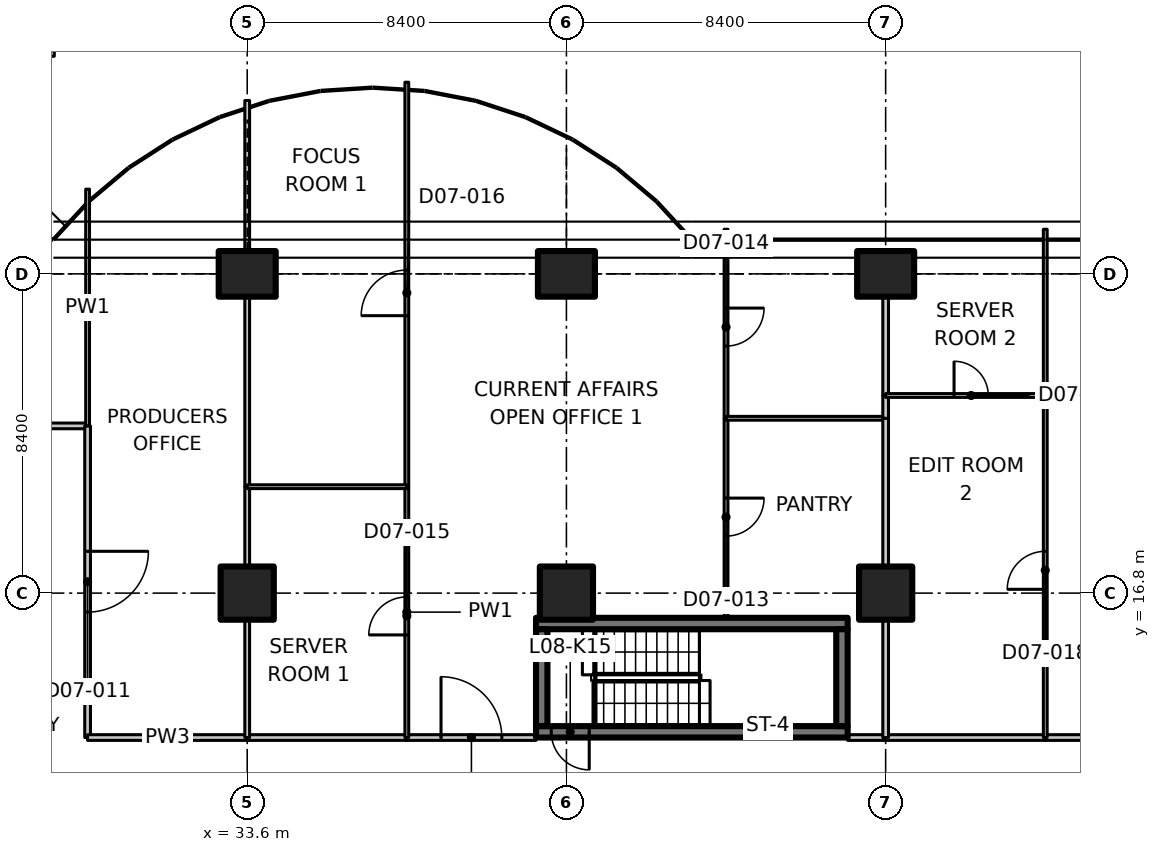
"""IFC4 building model, lengths in metres.
Left out: names, types, materials, properties, quantities, classifications, styles, units other than length and angle.
Written with IfcOpenShell. Run it as: python <this file> out.ifc"""

import sys

from ifc_helpers import new_model, si_unit, direction, frame, frame_2d, origin, origin_2d, place, context, subcontext, project, spatial, polyline, rectangle, outline, extrude, element, fill, save


model = new_model("IFC4")
c1 = context("Model", 3, precision=1e-05, world=origin(), true_north=direction((0.0, 1.0)))
c2 = subcontext(c1, "Body", "Model", "MODEL_VIEW")
j1 = project(units=[si_unit("LENGTHUNIT", "METRE"), si_unit("PLANEANGLEUNIT", "RADIAN")], contexts=[c1])
p1 = place(None, origin())
s1 = spatial("IfcSite", under=j1, at=p1, CompositionType="ELEMENT")
p2 = place(p1, origin())
s2 = spatial("IfcBuilding", under=s1, at=p2, CompositionType="ELEMENT")
p3 = place(p2, frame((0.0, 0.0, 43.7)))
s3 = spatial("IfcBuildingStorey", under=s2, at=p3, CompositionType="ELEMENT", Elevation=43.7)
p4 = place(p3, frame((33.6, 16.8, 0.0), z_axis=(0.0, 0.0, 1.0), x_axis=(1.0, 0.0, 0.0)))
e1 = element("IfcColumn", 1, at=p4, inside=s3, PredefinedType="COLUMN", context=c2, shape_type="SweptSolid", body=[
    extrude(rectangle(XDim=1.4, YDim=1.4, at=origin_2d()), origin(), (0.0, 0.0, 1.0), 3.35),
])
p5 = place(p3, frame((33.6, 25.2, 0.0), z_axis=(0.0, 0.0, 1.0), x_axis=(0.0, 1.0, 0.0)))
e2 = element("IfcColumn", 2, at=p5, inside=s3, PredefinedType="COLUMN", context=c2, shape_type="SweptSolid", body=[
    extrude(rectangle(XDim=1.2, YDim=1.5, at=origin_2d()), origin(), (0.0, 0.0, 1.0), 3.35),
])
p6 = place(p3, frame((42.0, 16.8, 0.0), z_axis=(0.0, 0.0, 1.0), x_axis=(1.0, 0.0, 0.0)))
e3 = element("IfcColumn", 3, at=p6, inside=s3, PredefinedType="COLUMN", context=c2, shape_type="SweptSolid", body=[
    extrude(rectangle(XDim=1.4, YDim=1.4, at=origin_2d()), origin(), (0.0, 0.0, 1.0), 3.35),
])
p7 = place(p3, frame((42.0, 25.2, 0.0), z_axis=(0.0, 0.0, 1.0), x_axis=(0.0, 1.0, 0.0)))
e4 = element("IfcColumn", 4, at=p7, inside=s3, PredefinedType="COLUMN", context=c2, shape_type="SweptSolid", body=[
    extrude(rectangle(XDim=1.2, YDim=1.5, at=origin_2d()), origin(), (0.0, 0.0, 1.0), 3.35),
])
p8 = place(p3, frame((50.4, 16.8, 0.0), z_axis=(0.0, 0.0, 1.0), x_axis=(1.0, 0.0, 0.0)))
e5 = element("IfcColumn", 5, at=p8, inside=s3, PredefinedType="COLUMN", context=c2, shape_type="SweptSolid", body=[
    extrude(rectangle(XDim=1.4, YDim=1.4, at=origin_2d()), origin(), (0.0, 0.0, 1.0), 3.35),
])
p9 = place(p3, frame((50.4, 25.2, 0.0), z_axis=(0.0, 0.0, 1.0), x_axis=(0.0, 1.0, 0.0)))
e6 = element("IfcColumn", 6, at=p9, inside=s3, PredefinedType="COLUMN", context=c2, shape_type="SweptSolid", body=[
    extrude(rectangle(XDim=1.2, YDim=1.5, at=origin_2d()), origin(), (0.0, 0.0, 1.0), 3.35),
])
p10 = place(p3, frame((49.4, 13.15, 0.0), z_axis=(0.0, 0.0, 1.0), x_axis=(-1.0, 0.0, 0.0)))
e7 = element("IfcWall", 7, at=p10, inside=s3, PredefinedType="SHEAR", context=c2, shape_type="SweptSolid", body=[
    extrude(rectangle(XDim=8.2, YDim=0.3, at=frame_2d((4.1, 0.0))), origin(), (0.0, 0.0, 1.0), 3.35),
])
p11 = place(p10, frame((6.8, 0.0, 0.0)))
e8 = element("IfcOpeningElement", 8, at=p11, cuts=e7, PredefinedType="OPENING", context=c2, shape_type="SweptSolid", body=[
    extrude(rectangle(XDim=1.0, YDim=2.1, at=frame_2d((0.5, 1.05))), frame((0.0, 0.16, 0.0), z_axis=(0.0, -1.0, 0.0), x_axis=(1.0, 0.0, 0.0)), (0.0, 0.0, 1.0), 0.32),
])
p12 = place(p3, frame((41.2, 16.0, 0.0), z_axis=(0.0, 0.0, 1.0), x_axis=(1.0, 0.0, 0.0)))
e9 = element("IfcWall", 9, at=p12, inside=s3, PredefinedType="SHEAR", context=c2, shape_type="SweptSolid", body=[
    extrude(rectangle(XDim=8.2, YDim=0.3, at=frame_2d((4.1, 0.0))), origin(), (0.0, 0.0, 1.0), 3.35),
])
for number, where, z_axis, x_axis in (
    (10, (41.35, 13.3, 0.0), (0.0, 0.0, 1.0), (0.0, 1.0, 0.0)),
    (11, (49.25, 13.3, 0.0), (0.0, 0.0, 1.0), (0.0, 1.0, 0.0)),
):
    element("IfcWall", number, at=place(p3, frame(where, z_axis=z_axis, x_axis=x_axis)), inside=s3, PredefinedType="SHEAR", context=c2, shape_type="SweptSolid", body=[
        extrude(rectangle(XDim=2.55, YDim=0.3, at=frame_2d((1.275, 0.0))), origin(), (0.0, 0.0, 1.0), 3.35),
    ])
p13 = place(p3, frame((25.2, 21.2, 0.0), z_axis=(0.0, 0.0, 1.0), x_axis=(1.0, 0.0, 0.0)))
e12 = element("IfcWall", 12, at=p13, inside=s3, PredefinedType="PARTITIONING", context=c2, shape_type="SweptSolid", body=[
    extrude(rectangle(XDim=4.2, YDim=0.15, at=frame_2d((2.1, 0.0))), origin(), (0.0, 0.0, 1.0), 3.33),
])
p14 = place(p3, frame((29.4, 21.2, 0.0), z_axis=(0.0, 0.0, 1.0), x_axis=(0.0, -1.0, 0.0)))
e13 = element("IfcWall", 13, at=p14, inside=s3, PredefinedType="PARTITIONING", context=c2, shape_type="SweptSolid", body=[
    extrude(rectangle(XDim=8.2, YDim=0.15, at=frame_2d((4.1, 0.0))), origin(), (0.0, 0.0, 1.0), 3.33),
])
p15 = place(p14, frame((3.3, 0.0, 0.0)))
e14 = element("IfcOpeningElement", 14, at=p15, cuts=e13, PredefinedType="OPENING", context=c2, shape_type="SweptSolid", body=[
    extrude(rectangle(XDim=1.6, YDim=2.1, at=frame_2d((0.8, 1.05))), frame((0.0, 0.085, 0.0), z_axis=(0.0, -1.0, 0.0), x_axis=(1.0, 0.0, 0.0)), (0.0, 0.0, 1.0), 0.17),
])
p16 = place(p3, frame((29.4, 27.429, 0.0), z_axis=(0.0, 0.0, 1.0), x_axis=(0.0, -1.0, 0.0)))
e15 = element("IfcWall", 15, at=p16, inside=s3, PredefinedType="PARTITIONING", context=c2, shape_type="SweptSolid", body=[
    extrude(outline(polyline([(0.0, 0.0), (6.229, 0.0), (6.229, 3.33), (2.679, 3.33), (2.677, 2.98), (1.781, 2.98), (1.779, 3.33), (0.154, 3.33), (0.0, 3.33), (0.0, 0.0)])), frame((0.0, 0.05, 0.0), z_axis=(0.0, -1.0, 0.0), x_axis=(1.0, 0.0, 0.0)), (0.0, 0.0, 1.0), 0.1),
])
p17 = place(p3, frame((25.2, 31.0, 0.0), z_axis=(0.0, 0.0, 1.0), x_axis=(1.0, 0.0, 0.0)))
e16 = element("IfcWall", 16, at=p17, inside=s3, PredefinedType="PARTITIONING", context=c2, shape_type="SweptSolid", body=[
    extrude(rectangle(XDim=3.324, YDim=0.15, at=frame_2d((1.662, 0.0))), origin(), (0.0, 0.0, 1.0), 2.98),
])
p18 = place(p3, frame((29.4, 13.0, 0.0), z_axis=(0.0, 0.0, 1.0), x_axis=(1.0, 0.0, 0.0)))
e17 = element("IfcWall", 17, at=p18, inside=s3, PredefinedType="PARTITIONING", context=c2, shape_type="SweptSolid", body=[
    extrude(rectangle(XDim=4.2, YDim=0.15, at=frame_2d((2.1, 0.0))), origin(), (0.0, 0.0, 1.0), 3.33),
])
p19 = place(p3, frame((37.8, 13.0, 0.0), z_axis=(0.0, 0.0, 1.0), x_axis=(1.0, 0.0, 0.0)))
e18 = element("IfcWall", 18, at=p19, inside=s3, PredefinedType="PARTITIONING", context=c2, shape_type="SweptSolid", body=[
    extrude(rectangle(XDim=3.4, YDim=0.15, at=frame_2d((1.7, 0.0))), origin(), (0.0, 0.0, 1.0), 3.33),
])
p20 = place(p19, frame((0.9, 0.0, 0.0)))
e19 = element("IfcOpeningElement", 19, at=p20, cuts=e18, PredefinedType="OPENING", context=c2, shape_type="SweptSolid", body=[
    extrude(rectangle(XDim=1.6, YDim=2.1, at=frame_2d((0.8, 1.05))), frame((0.0, 0.085, 0.0), z_axis=(0.0, -1.0, 0.0), x_axis=(1.0, 0.0, 0.0)), (0.0, 0.0, 1.0), 0.17),
])
p21 = place(p3, frame((49.4, 13.0, 0.0), z_axis=(0.0, 0.0, 1.0), x_axis=(1.0, 0.0, 0.0)))
e20 = element("IfcWall", 20, at=p21, inside=s3, PredefinedType="PARTITIONING", context=c2, shape_type="SweptSolid", body=[
    extrude(rectangle(XDim=1.0, YDim=0.15, at=frame_2d((0.5, 0.0))), origin(), (0.0, 0.0, 1.0), 3.33),
])
p22 = place(p3, frame((33.6, 13.0, 0.0), z_axis=(0.0, 0.0, 1.0), x_axis=(1.0, 0.0, 0.0)))
e21 = element("IfcWall", 21, at=p22, inside=s3, PredefinedType="PARTITIONING", context=c2, shape_type="SweptSolid", body=[
    extrude(rectangle(XDim=4.2, YDim=0.15, at=frame_2d((2.1, 0.0))), origin(), (0.0, 0.0, 1.0), 3.33),
])
p23 = place(p3, frame((54.6, 13.0, 0.0), z_axis=(0.0, 0.0, 1.0), x_axis=(1.0, 0.0, 0.0)))
e22 = element("IfcWall", 22, at=p23, inside=s3, PredefinedType="PARTITIONING", context=c2, shape_type="SweptSolid", body=[
    extrude(rectangle(XDim=8.4, YDim=0.15, at=frame_2d((4.2, 0.0))), origin(), (0.0, 0.0, 1.0), 3.33),
])
p24 = place(p23, frame((3.3, 0.0, 0.0)))
e23 = element("IfcOpeningElement", 23, at=p24, cuts=e22, PredefinedType="OPENING", context=c2, shape_type="SweptSolid", body=[
    extrude(rectangle(XDim=1.6, YDim=2.1, at=frame_2d((0.8, 1.05))), frame((0.0, 0.085, 0.0), z_axis=(0.0, -1.0, 0.0), x_axis=(1.0, 0.0, 0.0)), (0.0, 0.0, 1.0), 0.17),
])
p25 = place(p3, frame((50.4, 13.0, 0.0), z_axis=(0.0, 0.0, 1.0), x_axis=(1.0, 0.0, 0.0)))
e24 = element("IfcWall", 24, at=p25, inside=s3, PredefinedType="PARTITIONING", context=c2, shape_type="SweptSolid", body=[
    extrude(rectangle(XDim=4.2, YDim=0.15, at=frame_2d((2.1, 0.0))), origin(), (0.0, 0.0, 1.0), 3.33),
])
p26 = place(p3, frame((33.6, 19.6, 0.0), z_axis=(0.0, 0.0, 1.0), x_axis=(0.0, -1.0, 0.0)))
e25 = element("IfcWall", 25, at=p26, inside=s3, PredefinedType="PARTITIONING", context=c2, shape_type="SweptSolid", body=[
    extrude(rectangle(XDim=2.08, YDim=0.125, at=frame_2d((1.04, 0.0))), origin(), (0.0, 0.0, 1.0), 3.33),
])
p27 = place(p3, frame((33.6, 16.08, 0.0), z_axis=(0.0, 0.0, 1.0), x_axis=(0.0, -1.0, 0.0)))
e26 = element("IfcWall", 26, at=p27, inside=s3, PredefinedType="PARTITIONING", context=c2, shape_type="SweptSolid", body=[
    extrude(rectangle(XDim=3.08, YDim=0.125, at=frame_2d((1.54, 0.0))), origin(), (0.0, 0.0, 1.0), 3.33),
])
p28 = place(p3, frame((33.6, 29.762, 0.0), z_axis=(0.0, 0.0, 1.0), x_axis=(0.0, -1.0, 0.0)))
e27 = element("IfcWall", 27, at=p28, inside=s3, PredefinedType="PARTITIONING", context=c2, shape_type="SweptSolid", body=[
    extrude(rectangle(XDim=3.942, YDim=0.125, at=frame_2d((1.971, 0.0))), origin(), (0.0, 0.0, 1.0), 2.98),
])
p29 = place(p3, frame((33.6, 24.58, 0.0), z_axis=(0.0, 0.0, 1.0), x_axis=(0.0, -1.0, 0.0)))
e28 = element("IfcWall", 28, at=p29, inside=s3, PredefinedType="PARTITIONING", context=c2, shape_type="SweptSolid", body=[
    extrude(rectangle(XDim=4.98, YDim=0.125, at=frame_2d((2.49, 0.0))), origin(), (0.0, 0.0, 1.0), 3.33),
])
p30 = place(p3, frame((46.2, 21.4, 0.0), z_axis=(0.0, 0.0, 1.0), x_axis=(0.0, -1.0, 0.0)))
e29 = element("IfcWall", 29, at=p30, inside=s3, PredefinedType="PARTITIONING", context=c2, shape_type="SweptSolid", body=[
    extrude(rectangle(XDim=5.25, YDim=0.1, at=frame_2d((2.625, 0.0))), origin(), (0.0, 0.0, 1.0), 3.33),
])
p31 = place(p30, frame((2.1, 0.0, 0.0)))
e30 = element("IfcOpeningElement", 30, at=p31, cuts=e29, PredefinedType="OPENING", context=c2, shape_type="SweptSolid", body=[
    extrude(rectangle(XDim=1.0, YDim=2.1, at=frame_2d((0.5, 1.05))), frame((0.0, 0.06, 0.0), z_axis=(0.0, -1.0, 0.0), x_axis=(1.0, 0.0, 0.0)), (0.0, 0.0, 1.0), 0.12),
])
p32 = place(p3, frame((46.2, 26.374, 0.0), z_axis=(0.0, 0.0, 1.0), x_axis=(0.0, -1.0, 0.0)))
e31 = element("IfcWall", 31, at=p32, inside=s3, PredefinedType="PARTITIONING", context=c2, shape_type="SweptSolid", body=[
    extrude(outline(polyline([(0.0, 0.0), (4.974, 0.0), (4.974, 3.33), (1.624, 3.33), (1.622, 2.98), (0.726, 2.98), (0.724, 3.33), (0.074, 3.33), (0.0, 3.33), (0.0, 0.0)])), frame((0.0, 0.05, 0.0), z_axis=(0.0, -1.0, 0.0), x_axis=(1.0, 0.0, 0.0)), (0.0, 0.0, 1.0), 0.1),
])
p33 = place(p32, frame((2.074, 0.0, 0.0)))
e32 = element("IfcOpeningElement", 32, at=p33, cuts=e31, PredefinedType="OPENING", context=c2, shape_type="SweptSolid", body=[
    extrude(rectangle(XDim=1.0, YDim=2.1, at=frame_2d((0.5, 1.05))), frame((0.0, 0.06, 0.0), z_axis=(0.0, -1.0, 0.0), x_axis=(1.0, 0.0, 0.0)), (0.0, 0.0, 1.0), 0.12),
])
p34 = place(p3, frame((37.8, 13.0, 0.0), z_axis=(0.0, 0.0, 1.0), x_axis=(0.0, 1.0, 0.0)))
e33 = element("IfcWall", 33, at=p34, inside=s3, PredefinedType="PARTITIONING", context=c2, shape_type="SweptSolid", body=[
    extrude(rectangle(XDim=6.6, YDim=0.1, at=frame_2d((3.3, 0.0))), origin(), (0.0, 0.0, 1.0), 3.33),
])
p35 = place(p34, frame((2.7, 0.0, 0.0)))
e34 = element("IfcOpeningElement", 34, at=p35, cuts=e33, PredefinedType="OPENING", context=c2, shape_type="SweptSolid", body=[
    extrude(rectangle(XDim=1.0, YDim=2.1, at=frame_2d((0.5, 1.05))), frame((0.0, 0.06, 0.0), z_axis=(0.0, -1.0, 0.0), x_axis=(1.0, 0.0, 0.0)), (0.0, 0.0, 1.0), 0.12),
])
p36 = place(p3, frame((37.8, 19.6, 0.0), z_axis=(0.0, 0.0, 1.0), x_axis=(0.0, 1.0, 0.0)))
e35 = element("IfcWall", 35, at=p36, inside=s3, PredefinedType="PARTITIONING", context=c2, shape_type="SweptSolid", body=[
    extrude(outline(polyline([(0.0, 0.0), (10.643, 0.0), (10.643, 3.33), (6.05, 3.33), (6.048, 2.98), (5.152, 2.98), (5.15, 3.33), (0.0, 3.33), (0.0, 0.0)])), frame((0.0, 0.05, 0.0), z_axis=(0.0, -1.0, 0.0), x_axis=(1.0, 0.0, 0.0)), (0.0, 0.0, 1.0), 0.1),
])
p37 = place(p36, frame((4.5, 0.0, 0.0)))
e36 = element("IfcOpeningElement", 36, at=p37, cuts=e35, PredefinedType="OPENING", context=c2, shape_type="SweptSolid", body=[
    extrude(rectangle(XDim=1.2, YDim=2.1, at=frame_2d((0.6, 1.05))), frame((0.0, 0.06, 0.0), z_axis=(0.0, -1.0, 0.0), x_axis=(1.0, 0.0, 0.0)), (0.0, 0.0, 1.0), 0.12),
])
p38 = place(p3, frame((46.2, 21.4, 0.0), z_axis=(0.0, 0.0, 1.0), x_axis=(1.0, 0.0, 0.0)))
e37 = element("IfcWall", 37, at=p38, inside=s3, PredefinedType="PARTITIONING", context=c2, shape_type="SweptSolid", body=[
    extrude(rectangle(XDim=4.2, YDim=0.1, at=frame_2d((2.1, 0.0))), origin(), (0.0, 0.0, 1.0), 3.33),
])
p39 = place(p3, frame((50.4, 21.4, 0.0), z_axis=(0.0, 0.0, 1.0), x_axis=(0.0, -1.0, 0.0)))
e38 = element("IfcWall", 38, at=p39, inside=s3, PredefinedType="PARTITIONING", context=c2, shape_type="SweptSolid", body=[
    extrude(rectangle(XDim=3.88, YDim=0.15, at=frame_2d((1.94, 0.0))), origin(), (0.0, 0.0, 1.0), 3.33),
])
p40 = place(p3, frame((50.4, 16.08, 0.0), z_axis=(0.0, 0.0, 1.0), x_axis=(0.0, -1.0, 0.0)))
e39 = element("IfcWall", 39, at=p40, inside=s3, PredefinedType="PARTITIONING", context=c2, shape_type="SweptSolid", body=[
    extrude(rectangle(XDim=3.08, YDim=0.15, at=frame_2d((1.54, 0.0))), origin(), (0.0, 0.0, 1.0), 3.33),
])
p41 = place(p3, frame((50.4, 22.0, 0.0), z_axis=(0.0, 0.0, 1.0), x_axis=(0.0, -1.0, 0.0)))
e40 = element("IfcWall", 40, at=p41, inside=s3, PredefinedType="PARTITIONING", context=c2, shape_type="SweptSolid", body=[
    extrude(rectangle(XDim=0.6, YDim=0.15, at=frame_2d((0.3, 0.0))), origin(), (0.0, 0.0, 1.0), 3.33),
])
p42 = place(p3, frame((50.4, 24.58, 0.0), z_axis=(0.0, 0.0, 1.0), x_axis=(0.0, -1.0, 0.0)))
e41 = element("IfcWall", 41, at=p42, inside=s3, PredefinedType="PARTITIONING", context=c2, shape_type="SweptSolid", body=[
    extrude(rectangle(XDim=2.58, YDim=0.15, at=frame_2d((1.29, 0.0))), origin(), (0.0, 0.0, 1.0), 3.33),
])
p43 = place(p3, frame((33.6, 19.6, 0.0), z_axis=(0.0, 0.0, 1.0), x_axis=(1.0, 0.0, 0.0)))
e42 = element("IfcWall", 42, at=p43, inside=s3, PredefinedType="PARTITIONING", context=c2, shape_type="SweptSolid", body=[
    extrude(rectangle(XDim=4.2, YDim=0.1, at=frame_2d((2.1, 0.0))), origin(), (0.0, 0.0, 1.0), 3.33),
])
p44 = place(p3, frame((54.6, 13.0, 0.0), z_axis=(0.0, 0.0, 1.0), x_axis=(0.0, 1.0, 0.0)))
e43 = element("IfcWall", 43, at=p44, inside=s3, PredefinedType="PARTITIONING", context=c2, shape_type="SweptSolid", body=[
    extrude(rectangle(XDim=9.0, YDim=0.1, at=frame_2d((4.5, 0.0))), origin(), (0.0, 0.0, 1.0), 3.33),
])
p45 = place(p44, frame((3.9, 0.0, 0.0)))
e44 = element("IfcOpeningElement", 44, at=p45, cuts=e43, PredefinedType="OPENING", context=c2, shape_type="SweptSolid", body=[
    extrude(rectangle(XDim=1.0, YDim=2.1, at=frame_2d((0.5, 1.05))), frame((0.0, 0.06, 0.0), z_axis=(0.0, -1.0, 0.0), x_axis=(1.0, 0.0, 0.0)), (0.0, 0.0, 1.0), 0.12),
])
p46 = place(p3, frame((54.6, 22.0, 0.0), z_axis=(0.0, 0.0, 1.0), x_axis=(0.0, 1.0, 0.0)))
e45 = element("IfcWall", 45, at=p46, inside=s3, PredefinedType="PARTITIONING", context=c2, shape_type="SweptSolid", body=[
    extrude(rectangle(XDim=4.374, YDim=0.1, at=frame_2d((2.187, 0.0))), origin(), (0.0, 0.0, 1.0), 2.98),
])
p47 = place(p3, frame((50.4, 22.0, 0.0), z_axis=(0.0, 0.0, 1.0), x_axis=(1.0, 0.0, 0.0)))
e46 = element("IfcWall", 46, at=p47, inside=s3, PredefinedType="PARTITIONING", context=c2, shape_type="SweptSolid", body=[
    extrude(rectangle(XDim=4.2, YDim=0.1, at=frame_2d((2.1, 0.0))), origin(), (0.0, 0.0, 1.0), 3.33),
])
p48 = place(p47, frame((1.8, 0.0, 0.0)))
e47 = element("IfcOpeningElement", 47, at=p48, cuts=e46, PredefinedType="OPENING", context=c2, shape_type="SweptSolid", body=[
    extrude(rectangle(XDim=0.9, YDim=2.1, at=frame_2d((0.45, 1.05))), frame((0.0, 0.06, 0.0), z_axis=(0.0, -1.0, 0.0), x_axis=(1.0, 0.0, 0.0)), (0.0, 0.0, 1.0), 0.12),
])
p49 = place(p11, origin())
e48 = element("IfcDoor", 48, at=p49, inside=s3, OperationType="SINGLE_SWING_LEFT", PredefinedType="DOOR", context=c2, shape_type="SweptSolid", body=[
    extrude(rectangle(XDim=1.0, YDim=2.1, at=frame_2d((0.5, 1.05))), frame((0.0, 0.025, 0.0), z_axis=(0.0, -1.0, 0.0), x_axis=(1.0, 0.0, 0.0)), (0.0, 0.0, 1.0), 0.05),
])
fill(e8, e48)
p50 = place(p15, origin())
e49 = element("IfcDoor", 49, at=p50, inside=s3, OperationType="DOUBLE_DOOR_SINGLE_SWING", PredefinedType="DOOR", context=c2, shape_type="SweptSolid", body=[
    extrude(rectangle(XDim=1.6, YDim=2.1, at=frame_2d((0.8, 1.05))), frame((0.0, 0.025, 0.0), z_axis=(0.0, -1.0, 0.0), x_axis=(1.0, 0.0, 0.0)), (0.0, 0.0, 1.0), 0.05),
])
fill(e14, e49)
p51 = place(p20, origin())
e50 = element("IfcDoor", 50, at=p51, inside=s3, OperationType="DOUBLE_DOOR_SINGLE_SWING", PredefinedType="DOOR", context=c2, shape_type="SweptSolid", body=[
    extrude(rectangle(XDim=1.6, YDim=2.1, at=frame_2d((0.8, 1.05))), frame((0.0, 0.025, 0.0), z_axis=(0.0, -1.0, 0.0), x_axis=(1.0, 0.0, 0.0)), (0.0, 0.0, 1.0), 0.05),
])
fill(e19, e50)
p52 = place(p31, origin())
e51 = element("IfcDoor", 51, at=p52, inside=s3, OperationType="SINGLE_SWING_LEFT", PredefinedType="DOOR", context=c2, shape_type="SweptSolid", body=[
    extrude(rectangle(XDim=1.0, YDim=2.1, at=frame_2d((0.5, 1.05))), frame((0.0, 0.025, 0.0), z_axis=(0.0, -1.0, 0.0), x_axis=(1.0, 0.0, 0.0)), (0.0, 0.0, 1.0), 0.05),
])
fill(e30, e51)
p53 = place(p33, origin())
e52 = element("IfcDoor", 52, at=p53, inside=s3, OperationType="SINGLE_SWING_LEFT", PredefinedType="DOOR", context=c2, shape_type="SweptSolid", body=[
    extrude(rectangle(XDim=1.0, YDim=2.1, at=frame_2d((0.5, 1.05))), frame((0.0, 0.025, 0.0), z_axis=(0.0, -1.0, 0.0), x_axis=(1.0, 0.0, 0.0)), (0.0, 0.0, 1.0), 0.05),
])
fill(e32, e52)
p54 = place(p35, origin())
e53 = element("IfcDoor", 53, at=p54, inside=s3, OperationType="SINGLE_SWING_LEFT", PredefinedType="DOOR", context=c2, shape_type="SweptSolid", body=[
    extrude(rectangle(XDim=1.0, YDim=2.1, at=frame_2d((0.5, 1.05))), frame((0.0, 0.025, 0.0), z_axis=(0.0, -1.0, 0.0), x_axis=(1.0, 0.0, 0.0)), (0.0, 0.0, 1.0), 0.05),
])
fill(e34, e53)
p55 = place(p37, origin())
e54 = element("IfcDoor", 54, at=p55, inside=s3, OperationType="SINGLE_SWING_LEFT", PredefinedType="DOOR", context=c2, shape_type="SweptSolid", body=[
    extrude(rectangle(XDim=1.2, YDim=2.1, at=frame_2d((0.6, 1.05))), frame((0.0, 0.025, 0.0), z_axis=(0.0, -1.0, 0.0), x_axis=(1.0, 0.0, 0.0)), (0.0, 0.0, 1.0), 0.05),
])
fill(e36, e54)
p56 = place(p45, origin())
e55 = element("IfcDoor", 55, at=p56, inside=s3, OperationType="SINGLE_SWING_LEFT", PredefinedType="DOOR", context=c2, shape_type="SweptSolid", body=[
    extrude(rectangle(XDim=1.0, YDim=2.1, at=frame_2d((0.5, 1.05))), frame((0.0, 0.025, 0.0), z_axis=(0.0, -1.0, 0.0), x_axis=(1.0, 0.0, 0.0)), (0.0, 0.0, 1.0), 0.05),
])
fill(e44, e55)
p57 = place(p48, origin())
e56 = element("IfcDoor", 56, at=p57, inside=s3, OperationType="SINGLE_SWING_LEFT", PredefinedType="DOOR", context=c2, shape_type="SweptSolid", body=[
    extrude(rectangle(XDim=0.9, YDim=2.1, at=frame_2d((0.45, 1.05))), frame((0.0, 0.025, 0.0), z_axis=(0.0, -1.0, 0.0), x_axis=(1.0, 0.0, 0.0)), (0.0, 0.0, 1.0), 0.05),
])
fill(e47, e56)
save(model, sys.argv[1])
